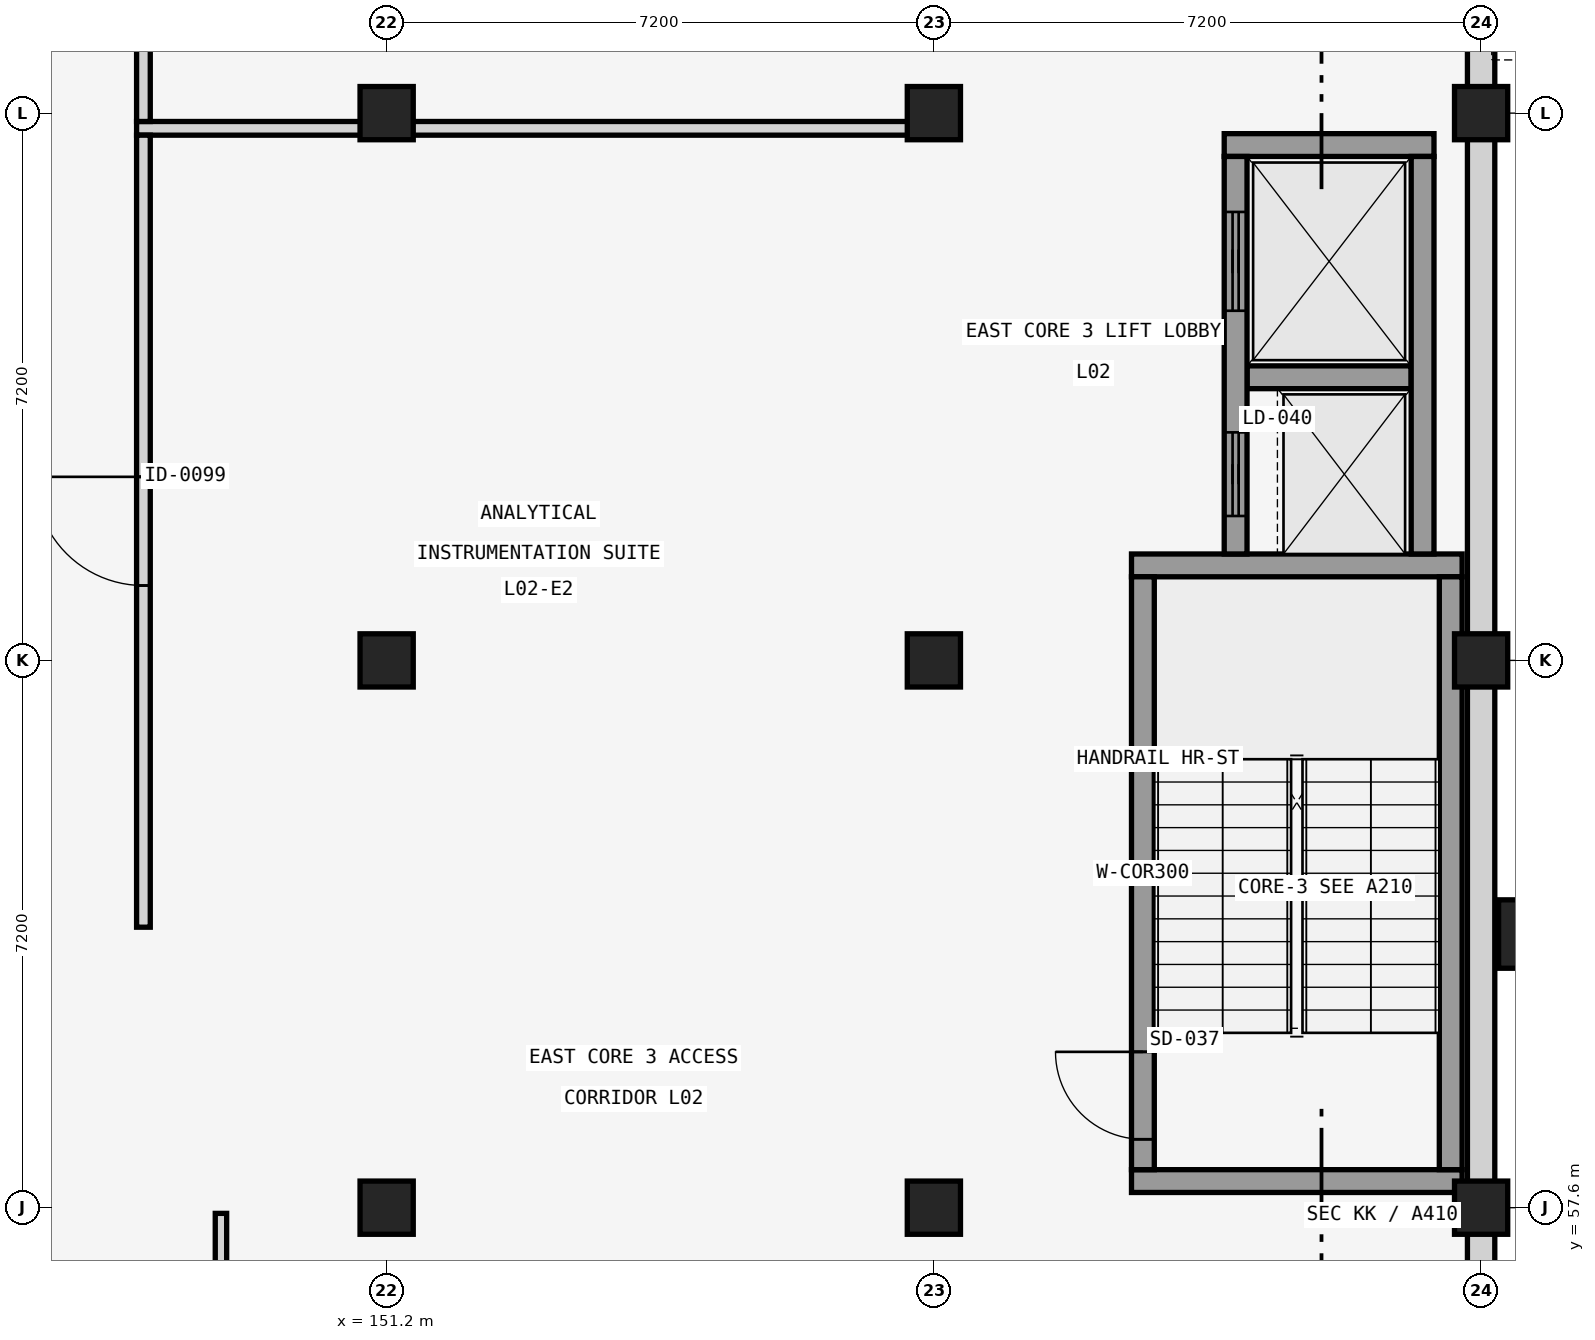
"""IFC4 building model, lengths in metres.
Left out: names, types, materials, properties, quantities, classifications, styles, units other than length and angle.
Written with IfcOpenShell. Run it as: python <this file> out.ifc"""

import sys

from ifc_helpers import new_model, si_unit, direction, frame, frame_2d, origin, origin_2d, place, context, subcontext, project, spatial, rectangle, extrude, element, fill, save


model = new_model("IFC4")
c1 = context("Model", 3, precision=1e-05, world=origin(), true_north=direction((0.0, 1.0)))
c2 = subcontext(c1, "Body", "Model", "MODEL_VIEW")
j1 = project(units=[si_unit("LENGTHUNIT", "METRE"), si_unit("PLANEANGLEUNIT", "RADIAN")], contexts=[c1])
p1 = place(None, origin())
s1 = spatial("IfcSite", under=j1, at=p1, CompositionType="ELEMENT")
p2 = place(p1, origin())
s2 = spatial("IfcBuilding", under=s1, at=p2, CompositionType="ELEMENT")
p3 = place(p2, frame((0.0, 0.0, 8.96)))
s3 = spatial("IfcBuildingStorey", under=s2, at=p3, CompositionType="ELEMENT", Elevation=8.96)
for number, where, z_axis, x_axis in (
    (1, (151.2, 57.6, 0.0), (0.0, 0.0, 1.0), (1.0, 0.0, 0.0)),
    (2, (151.2, 64.8, 0.0), (0.0, 0.0, 1.0), (1.0, 0.0, 0.0)),
    (3, (151.2, 72.0, 0.0), (0.0, 0.0, 1.0), (1.0, 0.0, 0.0)),
    (4, (158.4, 57.6, 0.0), (0.0, 0.0, 1.0), (1.0, 0.0, 0.0)),
    (5, (158.4, 64.8, 0.0), (0.0, 0.0, 1.0), (1.0, 0.0, 0.0)),
    (6, (158.4, 72.0, 0.0), (0.0, 0.0, 1.0), (1.0, 0.0, 0.0)),
    (7, (165.6, 57.6, 0.0), (0.0, 0.0, 1.0), (1.0, 0.0, 0.0)),
    (8, (165.6, 64.8, 0.0), (0.0, 0.0, 1.0), (1.0, 0.0, 0.0)),
    (9, (165.6, 72.0, 0.0), (0.0, 0.0, 1.0), (1.0, 0.0, 0.0)),
):
    element("IfcColumn", number, at=place(p3, frame(where, z_axis=z_axis, x_axis=x_axis)), inside=s3, PredefinedType="COLUMN", context=c2, shape_type="SweptSolid", body=[
        extrude(rectangle(XDim=0.7, YDim=0.7, at=origin_2d()), origin(), (0.0, 0.0, 1.0), 4.16),
    ])
p4 = place(p3, frame((166.08, 61.2, 0.0), z_axis=(0.0, 0.0, 1.0), x_axis=(1.0, 0.0, 0.0)))
e10 = element("IfcColumn", 10, at=p4, inside=s3, PredefinedType="PILASTER", context=c2, shape_type="SweptSolid", body=[
    extrude(rectangle(XDim=0.5, YDim=0.9, at=origin_2d()), origin(), (0.0, 0.0, 1.0), 4.16),
])
p5 = place(p3, frame((165.6, 50.74, 0.0), z_axis=(0.0, 0.0, 1.0), x_axis=(0.0, 1.0, 0.0)))
e11 = element("IfcWall", 11, at=p5, inside=s3, PredefinedType="SOLIDWALL", context=c2, shape_type="SweptSolid", body=[
    extrude(rectangle(XDim=6.52, YDim=0.36, at=frame_2d((3.26, 0.0))), origin(), (0.0, 0.0, 1.0), 3.21),
])
p6 = place(p5, frame((1.46, 0.0, 0.95)))
e12 = element("IfcOpeningElement", 12, at=p6, cuts=e11, PredefinedType="OPENING", context=c2, shape_type="SweptSolid", body=[
    extrude(rectangle(XDim=3.6, YDim=1.8, at=frame_2d((1.8, 0.9))), frame((0.0, 0.19, 0.0), z_axis=(0.0, -1.0, 0.0), x_axis=(1.0, 0.0, 0.0)), (0.0, 0.0, 1.0), 0.38),
])
for number, where, z_axis, x_axis in (
    (13, (165.6, 57.94, 0.0), (0.0, 0.0, 1.0), (0.0, 1.0, 0.0)),
    (14, (165.6, 65.14, 0.0), (0.0, 0.0, 1.0), (0.0, 1.0, 0.0)),
):
    element("IfcWall", number, at=place(p3, frame(where, z_axis=z_axis, x_axis=x_axis)), inside=s3, PredefinedType="SOLIDWALL", context=c2, shape_type="SweptSolid", body=[
        extrude(rectangle(XDim=6.52, YDim=0.36, at=frame_2d((3.26, 0.0))), origin(), (0.0, 0.0, 1.0), 3.81),
    ])
p7 = place(p3, frame((165.6, 72.34, 0.0), z_axis=(0.0, 0.0, 1.0), x_axis=(0.0, 1.0, 0.0)))
e15 = element("IfcWall", 15, at=p7, inside=s3, PredefinedType="SOLIDWALL", context=c2, shape_type="SweptSolid", body=[
    extrude(rectangle(XDim=6.52, YDim=0.36, at=frame_2d((3.26, 0.0))), origin(), (0.0, 0.0, 1.0), 3.21),
])
p8 = place(p7, frame((2.285, 0.0, 0.95)))
e16 = element("IfcOpeningElement", 16, at=p8, cuts=e15, PredefinedType="OPENING", context=c2, shape_type="SweptSolid", body=[
    extrude(rectangle(XDim=1.95, YDim=1.95, at=frame_2d((0.975, 0.975))), frame((0.0, 0.19, 0.0), z_axis=(0.0, -1.0, 0.0), x_axis=(1.0, 0.0, 0.0)), (0.0, 0.0, 1.0), 0.38),
])
for number, where, z_axis, x_axis in (
    (17, (161.0, 57.95, 0.0), (0.0, 0.0, 1.0), (1.0, 0.0, 0.0)),
    (18, (161.0, 66.05, 0.0), (0.0, 0.0, 1.0), (1.0, 0.0, 0.0)),
):
    element("IfcWall", number, at=place(p3, frame(where, z_axis=z_axis, x_axis=x_axis)), inside=s3, PredefinedType="SHEAR", context=c2, shape_type="SweptSolid", body=[
        extrude(rectangle(XDim=4.35, YDim=0.3, at=frame_2d((2.175, 0.0))), origin(), (0.0, 0.0, 1.0), 3.81),
    ])
p9 = place(p3, frame((161.15, 58.1, 0.0), z_axis=(0.0, 0.0, 1.0), x_axis=(0.0, 1.0, 0.0)))
e19 = element("IfcWall", 19, at=p9, inside=s3, PredefinedType="SHEAR", context=c2, shape_type="SweptSolid", body=[
    extrude(rectangle(XDim=7.8, YDim=0.3, at=frame_2d((3.9, 0.0))), origin(), (0.0, 0.0, 1.0), 3.81),
])
p10 = place(p9, frame((0.4, 0.0, 0.0)))
e20 = element("IfcOpeningElement", 20, at=p10, cuts=e19, PredefinedType="OPENING", context=c2, shape_type="SweptSolid", body=[
    extrude(rectangle(XDim=1.15, YDim=2.2, at=frame_2d((0.575, 1.1))), frame((0.0, 0.16, 0.0), z_axis=(0.0, -1.0, 0.0), x_axis=(1.0, 0.0, 0.0)), (0.0, 0.0, 1.0), 0.32),
])
p11 = place(p3, frame((165.2, 58.1, 0.0), z_axis=(0.0, 0.0, 1.0), x_axis=(0.0, 1.0, 0.0)))
e21 = element("IfcWall", 21, at=p11, inside=s3, PredefinedType="SHEAR", context=c2, shape_type="SweptSolid", body=[
    extrude(rectangle(XDim=7.8, YDim=0.3, at=frame_2d((3.9, 0.0))), origin(), (0.0, 0.0, 1.0), 3.81),
])
p12 = place(p3, frame((162.22, 71.58, 0.0), z_axis=(0.0, 0.0, 1.0), x_axis=(1.0, 0.0, 0.0)))
e22 = element("IfcWall", 22, at=p12, inside=s3, PredefinedType="SHEAR", context=c2, shape_type="SweptSolid", body=[
    extrude(rectangle(XDim=2.76, YDim=0.3, at=frame_2d((1.38, 0.0))), origin(), (0.0, 0.0, 1.0), 3.81),
])
p13 = place(p3, frame((162.52, 68.525, 0.0), z_axis=(0.0, 0.0, 1.0), x_axis=(1.0, 0.0, 0.0)))
e23 = element("IfcWall", 23, at=p13, inside=s3, PredefinedType="SHEAR", context=c2, shape_type="SweptSolid", body=[
    extrude(rectangle(XDim=2.16, YDim=0.3, at=frame_2d((1.08, 0.0))), origin(), (0.0, 0.0, 1.0), 3.81),
])
p14 = place(p3, frame((162.37, 66.2, 0.0), z_axis=(0.0, 0.0, 1.0), x_axis=(0.0, 1.0, 0.0)))
e24 = element("IfcWall", 24, at=p14, inside=s3, PredefinedType="SHEAR", context=c2, shape_type="SweptSolid", body=[
    extrude(rectangle(XDim=5.23, YDim=0.3, at=frame_2d((2.615, 0.0))), origin(), (0.0, 0.0, 1.0), 3.81),
])
p15 = place(p14, frame((0.5, 0.0, 0.0)))
e25 = element("IfcOpeningElement", 25, at=p15, cuts=e24, PredefinedType="OPENING", context=c2, shape_type="SweptSolid", body=[
    extrude(rectangle(XDim=1.1, YDim=2.2, at=frame_2d((0.55, 1.1))), frame((0.0, 0.16, 0.0), z_axis=(0.0, -1.0, 0.0), x_axis=(1.0, 0.0, 0.0)), (0.0, 0.0, 1.0), 0.32),
])
p16 = place(p14, frame((3.2, 0.0, 0.0)))
e26 = element("IfcOpeningElement", 26, at=p16, cuts=e24, PredefinedType="OPENING", context=c2, shape_type="SweptSolid", body=[
    extrude(rectangle(XDim=1.3, YDim=2.2, at=frame_2d((0.65, 1.1))), frame((0.0, 0.16, 0.0), z_axis=(0.0, -1.0, 0.0), x_axis=(1.0, 0.0, 0.0)), (0.0, 0.0, 1.0), 0.32),
])
p17 = place(p3, frame((164.83, 66.2, 0.0), z_axis=(0.0, 0.0, 1.0), x_axis=(0.0, 1.0, 0.0)))
e27 = element("IfcWall", 27, at=p17, inside=s3, PredefinedType="SHEAR", context=c2, shape_type="SweptSolid", body=[
    extrude(rectangle(XDim=5.23, YDim=0.3, at=frame_2d((2.615, 0.0))), origin(), (0.0, 0.0, 1.0), 3.81),
])
p18 = place(p3, frame((149.02, 36.16, 0.0), z_axis=(0.0, 0.0, 1.0), x_axis=(0.0, 1.0, 0.0)))
e28 = element("IfcWall", 28, at=p18, inside=s3, PredefinedType="PARTITIONING", context=c2, shape_type="SweptSolid", body=[
    extrude(rectangle(XDim=21.365, YDim=0.15, at=frame_2d((10.683, 0.0))), origin(), (0.0, 0.0, 1.0), 3.16),
])
p19 = place(p18, frame((9.992, 0.0, 0.0)))
e29 = element("IfcOpeningElement", 29, at=p19, cuts=e28, PredefinedType="OPENING", context=c2, shape_type="SweptSolid", body=[
    extrude(rectangle(XDim=1.38, YDim=2.12, at=frame_2d((0.69, 1.06))), frame((0.0, 0.085, 0.0), z_axis=(0.0, -1.0, 0.0), x_axis=(1.0, 0.0, 0.0)), (0.0, 0.0, 1.0), 0.17),
])
p20 = place(p3, frame((147.91, 71.8, 0.0), z_axis=(0.0, 0.0, 1.0), x_axis=(1.0, 0.0, 0.0)))
e30 = element("IfcWall", 30, at=p20, inside=s3, PredefinedType="PARTITIONING", context=c2, shape_type="SweptSolid", body=[
    extrude(rectangle(XDim=10.58, YDim=0.18, at=frame_2d((5.29, 0.0))), origin(), (0.0, 0.0, 1.0), 3.16),
])
p21 = place(p3, frame((148.0, 61.29, 0.0), z_axis=(0.0, 0.0, 1.0), x_axis=(0.0, 1.0, 0.0)))
e31 = element("IfcWall", 31, at=p21, inside=s3, PredefinedType="PARTITIONING", context=c2, shape_type="SweptSolid", body=[
    extrude(rectangle(XDim=10.42, YDim=0.18, at=frame_2d((5.21, 0.0))), origin(), (0.0, 0.0, 1.0), 3.16),
])
p22 = place(p21, frame((4.495, 0.0, 0.0)))
e32 = element("IfcOpeningElement", 32, at=p22, cuts=e31, PredefinedType="OPENING", context=c2, shape_type="SweptSolid", body=[
    extrude(rectangle(XDim=1.43, YDim=2.18, at=frame_2d((0.715, 1.09))), frame((0.0, 0.1, 0.0), z_axis=(0.0, -1.0, 0.0), x_axis=(1.0, 0.0, 0.0)), (0.0, 0.0, 1.0), 0.2),
])
p23 = place(p3, frame((148.0, 71.89, 0.0), z_axis=(0.0, 0.0, 1.0), x_axis=(0.0, 1.0, 0.0)))
e33 = element("IfcWall", 33, at=p23, inside=s3, PredefinedType="PARTITIONING", context=c2, shape_type="SweptSolid", body=[
    extrude(rectangle(XDim=28.82, YDim=0.18, at=frame_2d((14.41, 0.0))), origin(), (0.0, 0.0, 1.0), 3.16),
])
p24 = place(p23, frame((13.67, 0.0, 0.0)))
e34 = element("IfcOpeningElement", 34, at=p24, cuts=e33, PredefinedType="OPENING", context=c2, shape_type="SweptSolid", body=[
    extrude(rectangle(XDim=1.48, YDim=2.18, at=frame_2d((0.74, 1.09))), frame((0.0, 0.1, 0.0), z_axis=(0.0, -1.0, 0.0), x_axis=(1.0, 0.0, 0.0)), (0.0, 0.0, 1.0), 0.2),
])
p25 = place(p10, frame((1.15, 0.0, 0.0), z_axis=(0.0, 0.0, 1.0), x_axis=(-1.0, 0.0, 0.0)))
e35 = element("IfcDoor", 35, at=p25, inside=s3, OperationType="SINGLE_SWING_RIGHT", PredefinedType="DOOR", context=c2, shape_type="SweptSolid", body=[
    extrude(rectangle(XDim=1.15, YDim=2.2, at=frame_2d((0.575, 1.1))), frame((0.0, 0.025, 0.0), z_axis=(0.0, -1.0, 0.0), x_axis=(1.0, 0.0, 0.0)), (0.0, 0.0, 1.0), 0.05),
])
fill(e20, e35)
p26 = place(p15, origin())
e36 = element("IfcDoor", 36, at=p26, inside=s3, OperationType="SLIDING_TO_LEFT", PredefinedType="DOOR", context=c2, shape_type="SweptSolid", body=[
    extrude(rectangle(XDim=1.1, YDim=2.2, at=frame_2d((0.55, 1.1))), frame((0.0, 0.025, 0.0), z_axis=(0.0, -1.0, 0.0), x_axis=(1.0, 0.0, 0.0)), (0.0, 0.0, 1.0), 0.05),
])
fill(e25, e36)
p27 = place(p16, origin())
e37 = element("IfcDoor", 37, at=p27, inside=s3, OperationType="SLIDING_TO_LEFT", PredefinedType="DOOR", context=c2, shape_type="SweptSolid", body=[
    extrude(rectangle(XDim=1.3, YDim=2.2, at=frame_2d((0.65, 1.1))), frame((0.0, 0.025, 0.0), z_axis=(0.0, -1.0, 0.0), x_axis=(1.0, 0.0, 0.0)), (0.0, 0.0, 1.0), 0.05),
])
fill(e26, e37)
p28 = place(p22, origin())
e38 = element("IfcDoor", 38, at=p28, inside=s3, OperationType="SINGLE_SWING_RIGHT", PredefinedType="DOOR", context=c2, shape_type="SweptSolid", body=[
    extrude(rectangle(XDim=1.43, YDim=2.18, at=frame_2d((0.715, 1.09))), frame((0.0, 0.025, 0.0), z_axis=(0.0, -1.0, 0.0), x_axis=(1.0, 0.0, 0.0)), (0.0, 0.0, 1.0), 0.05),
])
fill(e32, e38)
save(model, sys.argv[1])
